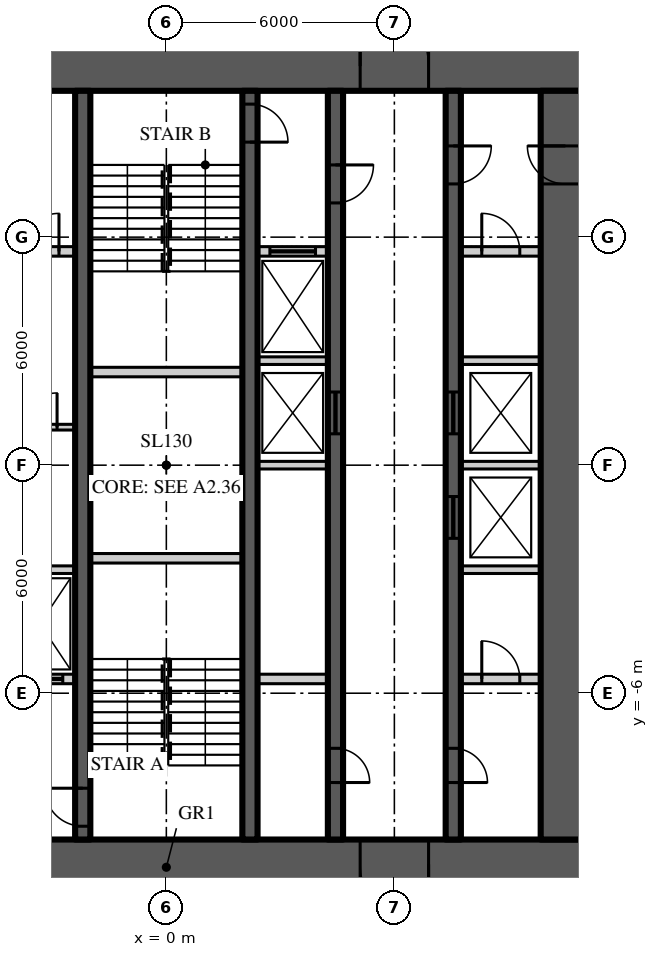
"""IFC4 building model, lengths in metres.
Left out: names, types, materials, properties, quantities, classifications, styles, units other than length and angle.
Written with IfcOpenShell. Run it as: python <this file> out.ifc"""

import sys

from ifc_helpers import new_model, si_unit, direction, frame, frame_2d, origin, place, context, subcontext, project, spatial, rectangle, extrude, element, fill, save


model = new_model("IFC4")
c1 = context("Model", 3, precision=1e-05, world=origin(), true_north=direction((0.0, 1.0)))
c2 = subcontext(c1, "Body", "Model", "MODEL_VIEW")
j1 = project(units=[si_unit("LENGTHUNIT", "METRE"), si_unit("PLANEANGLEUNIT", "RADIAN")], contexts=[c1])
p1 = place(None, origin())
s1 = spatial("IfcSite", under=j1, at=p1, CompositionType="ELEMENT")
p2 = place(p1, origin())
s2 = spatial("IfcBuilding", under=s1, at=p2, CompositionType="ELEMENT")
p3 = place(p2, frame((0.0, 0.0, 282.9)))
s3 = spatial("IfcBuildingStorey", under=s2, at=p3, CompositionType="ELEMENT", Elevation=282.9)
p4 = place(p3, frame((-11.15, 10.5, 0.0), z_axis=(0.0, 0.0, 1.0), x_axis=(1.0, 0.0, 0.0)))
e1 = element("IfcWall", 1, at=p4, inside=s3, PredefinedType="SHEAR", context=c2, shape_type="SweptSolid", body=[
    extrude(rectangle(XDim=22.3, YDim=1.3, at=frame_2d((11.15, 0.0))), origin(), (0.0, 0.0, 1.0), 3.9),
])
p5 = place(p4, frame((4.25, 0.0, 0.0)))
e2 = element("IfcOpeningElement", 2, at=p5, cuts=e1, PredefinedType="OPENING", context=c2, shape_type="SweptSolid", body=[
    extrude(rectangle(XDim=1.8, YDim=2.2, at=frame_2d((0.9, 1.1))), frame((0.0, 0.66, 0.0), z_axis=(0.0, -1.0, 0.0), x_axis=(1.0, 0.0, 0.0)), (0.0, 0.0, 1.0), 1.32),
])
p6 = place(p4, frame((16.25, 0.0, 0.0)))
e3 = element("IfcOpeningElement", 3, at=p6, cuts=e1, PredefinedType="OPENING", context=c2, shape_type="SweptSolid", body=[
    extrude(rectangle(XDim=1.8, YDim=2.2, at=frame_2d((0.9, 1.1))), frame((0.0, 0.66, 0.0), z_axis=(0.0, -1.0, 0.0), x_axis=(1.0, 0.0, 0.0)), (0.0, 0.0, 1.0), 1.32),
])
p7 = place(p3, frame((11.15, -10.5, 0.0), z_axis=(0.0, 0.0, 1.0), x_axis=(-1.0, 0.0, 0.0)))
e4 = element("IfcWall", 4, at=p7, inside=s3, PredefinedType="SHEAR", context=c2, shape_type="SweptSolid", body=[
    extrude(rectangle(XDim=22.3, YDim=1.3, at=frame_2d((11.15, 0.0))), origin(), (0.0, 0.0, 1.0), 3.9),
])
p8 = place(p7, frame((16.25, 0.0, 0.0)))
e5 = element("IfcOpeningElement", 5, at=p8, cuts=e4, PredefinedType="OPENING", context=c2, shape_type="SweptSolid", body=[
    extrude(rectangle(XDim=1.8, YDim=2.2, at=frame_2d((0.9, 1.1))), frame((0.0, 0.66, 0.0), z_axis=(0.0, -1.0, 0.0), x_axis=(1.0, 0.0, 0.0)), (0.0, 0.0, 1.0), 1.32),
])
p9 = place(p7, frame((4.25, 0.0, 0.0)))
e6 = element("IfcOpeningElement", 6, at=p9, cuts=e4, PredefinedType="OPENING", context=c2, shape_type="SweptSolid", body=[
    extrude(rectangle(XDim=1.8, YDim=2.2, at=frame_2d((0.9, 1.1))), frame((0.0, 0.66, 0.0), z_axis=(0.0, -1.0, 0.0), x_axis=(1.0, 0.0, 0.0)), (0.0, 0.0, 1.0), 1.32),
])
p10 = place(p3, frame((10.5, -9.85, 0.0), z_axis=(0.0, 0.0, 1.0), x_axis=(0.0, 1.0, 0.0)))
e7 = element("IfcWall", 7, at=p10, inside=s3, PredefinedType="SHEAR", context=c2, shape_type="SweptSolid", body=[
    extrude(rectangle(XDim=19.7, YDim=1.3, at=frame_2d((9.85, 0.0))), origin(), (0.0, 0.0, 1.0), 3.9),
])
p11 = place(p10, frame((17.25, 0.0, 0.0)))
e8 = element("IfcOpeningElement", 8, at=p11, cuts=e7, PredefinedType="OPENING", context=c2, shape_type="SweptSolid", body=[
    extrude(rectangle(XDim=1.0, YDim=2.2, at=frame_2d((0.5, 1.1))), frame((0.0, 0.66, 0.0), z_axis=(0.0, -1.0, 0.0), x_axis=(1.0, 0.0, 0.0)), (0.0, 0.0, 1.0), 1.32),
])
p12 = place(p3, frame((7.55, 9.85, 0.0), z_axis=(0.0, 0.0, 1.0), x_axis=(0.0, -1.0, 0.0)))
e9 = element("IfcWall", 9, at=p12, inside=s3, PredefinedType="SHEAR", context=c2, shape_type="SweptSolid", body=[
    extrude(rectangle(XDim=19.7, YDim=0.4, at=frame_2d((9.85, 0.0))), origin(), (0.0, 0.0, 1.0), 3.9),
])
p13 = place(p12, frame((1.45, 0.0, 0.0)))
e10 = element("IfcOpeningElement", 10, at=p13, cuts=e9, PredefinedType="OPENING", context=c2, shape_type="SweptSolid", body=[
    extrude(rectangle(XDim=1.0, YDim=2.2, at=frame_2d((0.5, 1.1))), frame((0.0, 0.21, 0.0), z_axis=(0.0, -1.0, 0.0), x_axis=(1.0, 0.0, 0.0)), (0.0, 0.0, 1.0), 0.42),
])
p14 = place(p12, frame((17.3, 0.0, 0.0)))
e11 = element("IfcOpeningElement", 11, at=p14, cuts=e9, PredefinedType="OPENING", context=c2, shape_type="SweptSolid", body=[
    extrude(rectangle(XDim=0.9, YDim=2.1, at=frame_2d((0.45, 1.05))), frame((0.0, 0.21, 0.0), z_axis=(0.0, -1.0, 0.0), x_axis=(1.0, 0.0, 0.0)), (0.0, 0.0, 1.0), 0.42),
])
p15 = place(p12, frame((7.925, 0.0, 0.0)))
e12 = element("IfcOpeningElement", 12, at=p15, cuts=e9, PredefinedType="OPENING", context=c2, shape_type="SweptSolid", body=[
    extrude(rectangle(XDim=1.1, YDim=2.2, at=frame_2d((0.55, 1.1))), frame((0.0, 0.21, 0.0), z_axis=(0.0, -1.0, 0.0), x_axis=(1.0, 0.0, 0.0)), (0.0, 0.0, 1.0), 0.42),
])
p16 = place(p12, frame((10.675, 0.0, 0.0)))
e13 = element("IfcOpeningElement", 13, at=p16, cuts=e9, PredefinedType="OPENING", context=c2, shape_type="SweptSolid", body=[
    extrude(rectangle(XDim=1.1, YDim=2.2, at=frame_2d((0.55, 1.1))), frame((0.0, 0.21, 0.0), z_axis=(0.0, -1.0, 0.0), x_axis=(1.0, 0.0, 0.0)), (0.0, 0.0, 1.0), 0.42),
])
p17 = place(p3, frame((4.45, 9.85, 0.0), z_axis=(0.0, 0.0, 1.0), x_axis=(0.0, -1.0, 0.0)))
e14 = element("IfcWall", 14, at=p17, inside=s3, PredefinedType="SHEAR", context=c2, shape_type="SweptSolid", body=[
    extrude(rectangle(XDim=19.7, YDim=0.4, at=frame_2d((9.85, 0.0))), origin(), (0.0, 0.0, 1.0), 3.9),
])
p18 = place(p17, frame((1.95, 0.0, 0.0)))
e15 = element("IfcOpeningElement", 15, at=p18, cuts=e14, PredefinedType="OPENING", context=c2, shape_type="SweptSolid", body=[
    extrude(rectangle(XDim=1.0, YDim=2.2, at=frame_2d((0.5, 1.1))), frame((0.0, 0.21, 0.0), z_axis=(0.0, -1.0, 0.0), x_axis=(1.0, 0.0, 0.0)), (0.0, 0.0, 1.0), 0.42),
])
p19 = place(p17, frame((17.3, 0.0, 0.0)))
e16 = element("IfcOpeningElement", 16, at=p19, cuts=e14, PredefinedType="OPENING", context=c2, shape_type="SweptSolid", body=[
    extrude(rectangle(XDim=0.9, YDim=2.1, at=frame_2d((0.45, 1.05))), frame((0.0, 0.21, 0.0), z_axis=(0.0, -1.0, 0.0), x_axis=(1.0, 0.0, 0.0)), (0.0, 0.0, 1.0), 0.42),
])
p20 = place(p17, frame((7.925, 0.0, 0.0)))
e17 = element("IfcOpeningElement", 17, at=p20, cuts=e14, PredefinedType="OPENING", context=c2, shape_type="SweptSolid", body=[
    extrude(rectangle(XDim=1.1, YDim=2.2, at=frame_2d((0.55, 1.1))), frame((0.0, 0.21, 0.0), z_axis=(0.0, -1.0, 0.0), x_axis=(1.0, 0.0, 0.0)), (0.0, 0.0, 1.0), 0.42),
])
p21 = place(p3, frame((-2.2, -9.85, 0.0), z_axis=(0.0, 0.0, 1.0), x_axis=(0.0, 1.0, 0.0)))
e18 = element("IfcWall", 18, at=p21, inside=s3, PredefinedType="SHEAR", context=c2, shape_type="SweptSolid", body=[
    extrude(rectangle(XDim=19.7, YDim=0.4, at=frame_2d((9.85, 0.0))), origin(), (0.0, 0.0, 1.0), 3.9),
])
p22 = place(p21, frame((0.35, 0.0, 0.0)))
e19 = element("IfcOpeningElement", 19, at=p22, cuts=e18, PredefinedType="OPENING", context=c2, shape_type="SweptSolid", body=[
    extrude(rectangle(XDim=1.0, YDim=2.2, at=frame_2d((0.5, 1.1))), frame((0.0, 0.21, 0.0), z_axis=(0.0, -1.0, 0.0), x_axis=(1.0, 0.0, 0.0)), (0.0, 0.0, 1.0), 0.42),
])
p23 = place(p3, frame((2.2, 9.85, 0.0), z_axis=(0.0, 0.0, 1.0), x_axis=(0.0, -1.0, 0.0)))
e20 = element("IfcWall", 20, at=p23, inside=s3, PredefinedType="SHEAR", context=c2, shape_type="SweptSolid", body=[
    extrude(rectangle(XDim=19.7, YDim=0.4, at=frame_2d((9.85, 0.0))), origin(), (0.0, 0.0, 1.0), 3.9),
])
p24 = place(p23, frame((0.35, 0.0, 0.0)))
e21 = element("IfcOpeningElement", 21, at=p24, cuts=e20, PredefinedType="OPENING", context=c2, shape_type="SweptSolid", body=[
    extrude(rectangle(XDim=1.0, YDim=2.2, at=frame_2d((0.5, 1.1))), frame((0.0, 0.21, 0.0), z_axis=(0.0, -1.0, 0.0), x_axis=(1.0, 0.0, 0.0)), (0.0, 0.0, 1.0), 0.42),
])
p25 = place(p3, frame((-4.25, 5.625, 0.0), z_axis=(0.0, 0.0, 1.0), x_axis=(1.0, 0.0, 0.0)))
e22 = element("IfcWall", 22, at=p25, inside=s3, PredefinedType="SOLIDWALL", context=c2, shape_type="SweptSolid", body=[
    extrude(rectangle(XDim=1.85, YDim=0.25, at=frame_2d((0.925, 0.0))), origin(), (0.0, 0.0, 1.0), 3.7),
])
p26 = place(p25, frame((0.425, 0.0, 0.0)))
e23 = element("IfcOpeningElement", 23, at=p26, cuts=e22, PredefinedType="OPENING", context=c2, shape_type="SweptSolid", body=[
    extrude(rectangle(XDim=1.0, YDim=2.2, at=frame_2d((0.5, 1.1))), frame((0.0, 0.135, 0.0), z_axis=(0.0, -1.0, 0.0), x_axis=(1.0, 0.0, 0.0)), (0.0, 0.0, 1.0), 0.27),
])
p27 = place(p3, frame((2.4, 5.625, 0.0), z_axis=(0.0, 0.0, 1.0), x_axis=(1.0, 0.0, 0.0)))
e24 = element("IfcWall", 24, at=p27, inside=s3, PredefinedType="SOLIDWALL", context=c2, shape_type="SweptSolid", body=[
    extrude(rectangle(XDim=1.85, YDim=0.25, at=frame_2d((0.925, 0.0))), origin(), (0.0, 0.0, 1.0), 3.7),
])
p28 = place(p27, frame((0.325, 0.0, 0.0)))
e25 = element("IfcOpeningElement", 25, at=p28, cuts=e24, PredefinedType="OPENING", context=c2, shape_type="SweptSolid", body=[
    extrude(rectangle(XDim=1.2, YDim=2.2, at=frame_2d((0.6, 1.1))), frame((0.0, 0.135, 0.0), z_axis=(0.0, -1.0, 0.0), x_axis=(1.0, 0.0, 0.0)), (0.0, 0.0, 1.0), 0.27),
])
p29 = place(p3, frame((7.75, 5.625, 0.0), z_axis=(0.0, 0.0, 1.0), x_axis=(1.0, 0.0, 0.0)))
e26 = element("IfcWall", 26, at=p29, inside=s3, PredefinedType="SOLIDWALL", context=c2, shape_type="SweptSolid", body=[
    extrude(rectangle(XDim=2.1, YDim=0.25, at=frame_2d((1.05, 0.0))), origin(), (0.0, 0.0, 1.0), 3.7),
])
p30 = place(p29, frame((0.55, 0.0, 0.0)))
e27 = element("IfcOpeningElement", 27, at=p30, cuts=e26, PredefinedType="OPENING", context=c2, shape_type="SweptSolid", body=[
    extrude(rectangle(XDim=1.0, YDim=2.2, at=frame_2d((0.5, 1.1))), frame((0.0, 0.135, 0.0), z_axis=(0.0, -1.0, 0.0), x_axis=(1.0, 0.0, 0.0)), (0.0, 0.0, 1.0), 0.27),
])
p31 = place(p3, frame((-4.25, -5.625, 0.0), z_axis=(0.0, 0.0, 1.0), x_axis=(1.0, 0.0, 0.0)))
e28 = element("IfcWall", 28, at=p31, inside=s3, PredefinedType="SOLIDWALL", context=c2, shape_type="SweptSolid", body=[
    extrude(rectangle(XDim=1.85, YDim=0.25, at=frame_2d((0.925, 0.0))), origin(), (0.0, 0.0, 1.0), 3.7),
])
p32 = place(p31, frame((0.325, 0.0, 0.0)))
e29 = element("IfcOpeningElement", 29, at=p32, cuts=e28, PredefinedType="OPENING", context=c2, shape_type="SweptSolid", body=[
    extrude(rectangle(XDim=1.2, YDim=2.2, at=frame_2d((0.6, 1.1))), frame((0.0, 0.135, 0.0), z_axis=(0.0, -1.0, 0.0), x_axis=(1.0, 0.0, 0.0)), (0.0, 0.0, 1.0), 0.27),
])
p33 = place(p3, frame((2.4, -5.625, 0.0), z_axis=(0.0, 0.0, 1.0), x_axis=(1.0, 0.0, 0.0)))
e30 = element("IfcWall", 30, at=p33, inside=s3, PredefinedType="SOLIDWALL", context=c2, shape_type="SweptSolid", body=[
    extrude(rectangle(XDim=1.85, YDim=0.25, at=frame_2d((0.925, 0.0))), origin(), (0.0, 0.0, 1.0), 3.7),
])
p34 = place(p3, frame((7.75, -5.625, 0.0), z_axis=(0.0, 0.0, 1.0), x_axis=(1.0, 0.0, 0.0)))
e31 = element("IfcWall", 31, at=p34, inside=s3, PredefinedType="SOLIDWALL", context=c2, shape_type="SweptSolid", body=[
    extrude(rectangle(XDim=2.1, YDim=0.25, at=frame_2d((1.05, 0.0))), origin(), (0.0, 0.0, 1.0), 3.7),
])
p35 = place(p34, frame((0.55, 0.0, 0.0)))
e32 = element("IfcOpeningElement", 32, at=p35, cuts=e31, PredefinedType="OPENING", context=c2, shape_type="SweptSolid", body=[
    extrude(rectangle(XDim=1.0, YDim=2.2, at=frame_2d((0.5, 1.1))), frame((0.0, 0.135, 0.0), z_axis=(0.0, -1.0, 0.0), x_axis=(1.0, 0.0, 0.0)), (0.0, 0.0, 1.0), 0.27),
])
for number, where, z_axis, x_axis in (
    (33, (-2.0, -2.45, 0.0), (0.0, 0.0, 1.0), (1.0, 0.0, 0.0)),
    (34, (-2.0, 2.45, 0.0), (0.0, 0.0, 1.0), (1.0, 0.0, 0.0)),
):
    element("IfcWall", number, at=place(p3, frame(where, z_axis=z_axis, x_axis=x_axis)), inside=s3, PredefinedType="SOLIDWALL", context=c2, shape_type="SweptSolid", body=[
        extrude(rectangle(XDim=4.0, YDim=0.25, at=frame_2d((2.0, 0.0))), origin(), (0.0, 0.0, 1.0), 3.7),
    ])
p36 = place(p3, frame((-4.25, -2.75, 0.0), z_axis=(0.0, 0.0, 1.0), x_axis=(1.0, 0.0, 0.0)))
e35 = element("IfcWall", 35, at=p36, inside=s3, PredefinedType="SOLIDWALL", context=c2, shape_type="SweptSolid", body=[
    extrude(rectangle(XDim=1.85, YDim=0.2, at=frame_2d((0.925, 0.0))), origin(), (0.0, 0.0, 1.0), 3.7),
])
p37 = place(p3, frame((7.75, -2.75, 0.0), z_axis=(0.0, 0.0, 1.0), x_axis=(1.0, 0.0, 0.0)))
e36 = element("IfcWall", 36, at=p37, inside=s3, PredefinedType="SOLIDWALL", context=c2, shape_type="SweptSolid", body=[
    extrude(rectangle(XDim=2.1, YDim=0.2, at=frame_2d((1.05, 0.0))), origin(), (0.0, 0.0, 1.0), 3.7),
])
p38 = place(p3, frame((2.4, 0.0, 0.0), z_axis=(0.0, 0.0, 1.0), x_axis=(1.0, 0.0, 0.0)))
e37 = element("IfcWall", 37, at=p38, inside=s3, PredefinedType="SOLIDWALL", context=c2, shape_type="SweptSolid", body=[
    extrude(rectangle(XDim=1.85, YDim=0.2, at=frame_2d((0.925, 0.0))), origin(), (0.0, 0.0, 1.0), 3.7),
])
p39 = place(p3, frame((7.75, 0.0, 0.0), z_axis=(0.0, 0.0, 1.0), x_axis=(1.0, 0.0, 0.0)))
e38 = element("IfcWall", 38, at=p39, inside=s3, PredefinedType="SOLIDWALL", context=c2, shape_type="SweptSolid", body=[
    extrude(rectangle(XDim=2.1, YDim=0.2, at=frame_2d((1.05, 0.0))), origin(), (0.0, 0.0, 1.0), 3.7),
])
p40 = place(p3, frame((2.4, 2.75, 0.0), z_axis=(0.0, 0.0, 1.0), x_axis=(1.0, 0.0, 0.0)))
e39 = element("IfcWall", 39, at=p40, inside=s3, PredefinedType="SOLIDWALL", context=c2, shape_type="SweptSolid", body=[
    extrude(rectangle(XDim=1.85, YDim=0.2, at=frame_2d((0.925, 0.0))), origin(), (0.0, 0.0, 1.0), 3.7),
])
p41 = place(p3, frame((7.75, 2.75, 0.0), z_axis=(0.0, 0.0, 1.0), x_axis=(1.0, 0.0, 0.0)))
e40 = element("IfcWall", 40, at=p41, inside=s3, PredefinedType="SOLIDWALL", context=c2, shape_type="SweptSolid", body=[
    extrude(rectangle(XDim=2.1, YDim=0.2, at=frame_2d((1.05, 0.0))), origin(), (0.0, 0.0, 1.0), 3.7),
])
p42 = place(p3, frame((-4.25, 1.0, 0.0), z_axis=(0.0, 0.0, 1.0), x_axis=(1.0, 0.0, 0.0)))
e41 = element("IfcWall", 41, at=p42, inside=s3, PredefinedType="SOLIDWALL", context=c2, shape_type="SweptSolid", body=[
    extrude(rectangle(XDim=1.85, YDim=0.15, at=frame_2d((0.925, 0.0))), origin(), (0.0, 0.0, 1.0), 3.77),
])
p43 = place(p42, frame((0.475, 0.0, 0.0)))
e42 = element("IfcOpeningElement", 42, at=p43, cuts=e41, PredefinedType="OPENING", context=c2, shape_type="SweptSolid", body=[
    extrude(rectangle(XDim=0.9, YDim=2.1, at=frame_2d((0.45, 1.05))), frame((0.0, 0.085, 0.0), z_axis=(0.0, -1.0, 0.0), x_axis=(1.0, 0.0, 0.0)), (0.0, 0.0, 1.0), 0.17),
])
p44 = place(p6, origin())
e43 = element("IfcDoor", 43, at=p44, inside=s3, OperationType="DOUBLE_DOOR_DOUBLE_SWING", PredefinedType="DOOR", context=c2, shape_type="SweptSolid", body=[
    extrude(rectangle(XDim=1.8, YDim=2.2, at=frame_2d((0.9, 1.1))), frame((0.0, 0.025, 0.0), z_axis=(0.0, -1.0, 0.0), x_axis=(1.0, 0.0, 0.0)), (0.0, 0.0, 1.0), 0.05),
])
fill(e3, e43)
p45 = place(p9, origin())
e44 = element("IfcDoor", 44, at=p45, inside=s3, OperationType="DOUBLE_DOOR_DOUBLE_SWING", PredefinedType="DOOR", context=c2, shape_type="SweptSolid", body=[
    extrude(rectangle(XDim=1.8, YDim=2.2, at=frame_2d((0.9, 1.1))), frame((0.0, 0.025, 0.0), z_axis=(0.0, -1.0, 0.0), x_axis=(1.0, 0.0, 0.0)), (0.0, 0.0, 1.0), 0.05),
])
fill(e6, e44)
p46 = place(p13, origin())
e45 = element("IfcDoor", 45, at=p46, inside=s3, OperationType="SINGLE_SWING_LEFT", PredefinedType="DOOR", context=c2, shape_type="SweptSolid", body=[
    extrude(rectangle(XDim=1.0, YDim=2.2, at=frame_2d((0.5, 1.1))), frame((0.0, 0.025, 0.0), z_axis=(0.0, -1.0, 0.0), x_axis=(1.0, 0.0, 0.0)), (0.0, 0.0, 1.0), 0.05),
])
fill(e10, e45)
p47 = place(p11, origin())
e46 = element("IfcDoor", 46, at=p47, inside=s3, OperationType="SINGLE_SWING_RIGHT", PredefinedType="DOOR", context=c2, shape_type="SweptSolid", body=[
    extrude(rectangle(XDim=1.0, YDim=2.2, at=frame_2d((0.5, 1.1))), frame((0.0, 0.025, 0.0), z_axis=(0.0, -1.0, 0.0), x_axis=(1.0, 0.0, 0.0)), (0.0, 0.0, 1.0), 0.05),
])
fill(e8, e46)
p48 = place(p22, origin())
e47 = element("IfcDoor", 47, at=p48, inside=s3, OperationType="SINGLE_SWING_RIGHT", PredefinedType="DOOR", context=c2, shape_type="SweptSolid", body=[
    extrude(rectangle(XDim=1.0, YDim=2.2, at=frame_2d((0.5, 1.1))), frame((0.0, 0.025, 0.0), z_axis=(0.0, -1.0, 0.0), x_axis=(1.0, 0.0, 0.0)), (0.0, 0.0, 1.0), 0.05),
])
fill(e19, e47)
p49 = place(p18, origin())
e48 = element("IfcDoor", 48, at=p49, inside=s3, OperationType="SINGLE_SWING_LEFT", PredefinedType="DOOR", context=c2, shape_type="SweptSolid", body=[
    extrude(rectangle(XDim=1.0, YDim=2.2, at=frame_2d((0.5, 1.1))), frame((0.0, 0.025, 0.0), z_axis=(0.0, -1.0, 0.0), x_axis=(1.0, 0.0, 0.0)), (0.0, 0.0, 1.0), 0.05),
])
fill(e15, e48)
p50 = place(p24, origin())
e49 = element("IfcDoor", 49, at=p50, inside=s3, OperationType="SINGLE_SWING_RIGHT", PredefinedType="DOOR", context=c2, shape_type="SweptSolid", body=[
    extrude(rectangle(XDim=1.0, YDim=2.2, at=frame_2d((0.5, 1.1))), frame((0.0, 0.025, 0.0), z_axis=(0.0, -1.0, 0.0), x_axis=(1.0, 0.0, 0.0)), (0.0, 0.0, 1.0), 0.05),
])
fill(e21, e49)
p51 = place(p14, origin())
e50 = element("IfcDoor", 50, at=p51, inside=s3, OperationType="SINGLE_SWING_RIGHT", PredefinedType="DOOR", context=c2, shape_type="SweptSolid", body=[
    extrude(rectangle(XDim=0.9, YDim=2.1, at=frame_2d((0.45, 1.05))), frame((0.0, 0.025, 0.0), z_axis=(0.0, -1.0, 0.0), x_axis=(1.0, 0.0, 0.0)), (0.0, 0.0, 1.0), 0.05),
])
fill(e11, e50)
p52 = place(p19, origin())
e51 = element("IfcDoor", 51, at=p52, inside=s3, OperationType="SINGLE_SWING_RIGHT", PredefinedType="DOOR", context=c2, shape_type="SweptSolid", body=[
    extrude(rectangle(XDim=0.9, YDim=2.1, at=frame_2d((0.45, 1.05))), frame((0.0, 0.025, 0.0), z_axis=(0.0, -1.0, 0.0), x_axis=(1.0, 0.0, 0.0)), (0.0, 0.0, 1.0), 0.05),
])
fill(e16, e51)
p53 = place(p15, origin())
e52 = element("IfcDoor", 52, at=p53, inside=s3, OperationType="SLIDING_TO_LEFT", PredefinedType="DOOR", context=c2, shape_type="SweptSolid", body=[
    extrude(rectangle(XDim=1.1, YDim=2.2, at=frame_2d((0.55, 1.1))), frame((0.0, 0.025, 0.0), z_axis=(0.0, -1.0, 0.0), x_axis=(1.0, 0.0, 0.0)), (0.0, 0.0, 1.0), 0.05),
])
fill(e12, e52)
p54 = place(p16, origin())
e53 = element("IfcDoor", 53, at=p54, inside=s3, OperationType="SLIDING_TO_LEFT", PredefinedType="DOOR", context=c2, shape_type="SweptSolid", body=[
    extrude(rectangle(XDim=1.1, YDim=2.2, at=frame_2d((0.55, 1.1))), frame((0.0, 0.025, 0.0), z_axis=(0.0, -1.0, 0.0), x_axis=(1.0, 0.0, 0.0)), (0.0, 0.0, 1.0), 0.05),
])
fill(e13, e53)
p55 = place(p20, origin())
e54 = element("IfcDoor", 54, at=p55, inside=s3, OperationType="SLIDING_TO_LEFT", PredefinedType="DOOR", context=c2, shape_type="SweptSolid", body=[
    extrude(rectangle(XDim=1.1, YDim=2.2, at=frame_2d((0.55, 1.1))), frame((0.0, 0.025, 0.0), z_axis=(0.0, -1.0, 0.0), x_axis=(1.0, 0.0, 0.0)), (0.0, 0.0, 1.0), 0.05),
])
fill(e17, e54)
p56 = place(p32, origin())
e55 = element("IfcDoor", 55, at=p56, inside=s3, OperationType="SLIDING_TO_LEFT", PredefinedType="DOOR", context=c2, shape_type="SweptSolid", body=[
    extrude(rectangle(XDim=1.2, YDim=2.2, at=frame_2d((0.6, 1.1))), frame((0.0, 0.025, 0.0), z_axis=(0.0, -1.0, 0.0), x_axis=(1.0, 0.0, 0.0)), (0.0, 0.0, 1.0), 0.05),
])
fill(e29, e55)
p57 = place(p28, origin())
e56 = element("IfcDoor", 56, at=p57, inside=s3, OperationType="SLIDING_TO_LEFT", PredefinedType="DOOR", context=c2, shape_type="SweptSolid", body=[
    extrude(rectangle(XDim=1.2, YDim=2.2, at=frame_2d((0.6, 1.1))), frame((0.0, 0.025, 0.0), z_axis=(0.0, -1.0, 0.0), x_axis=(1.0, 0.0, 0.0)), (0.0, 0.0, 1.0), 0.05),
])
fill(e25, e56)
p58 = place(p43, origin())
e57 = element("IfcDoor", 57, at=p58, inside=s3, OperationType="SINGLE_SWING_RIGHT", PredefinedType="DOOR", context=c2, shape_type="SweptSolid", body=[
    extrude(rectangle(XDim=0.9, YDim=2.1, at=frame_2d((0.45, 1.05))), frame((0.0, 0.025, 0.0), z_axis=(0.0, -1.0, 0.0), x_axis=(1.0, 0.0, 0.0)), (0.0, 0.0, 1.0), 0.05),
])
fill(e42, e57)
p59 = place(p26, origin())
e58 = element("IfcDoor", 58, at=p59, inside=s3, OperationType="SINGLE_SWING_RIGHT", PredefinedType="DOOR", context=c2, shape_type="SweptSolid", body=[
    extrude(rectangle(XDim=1.0, YDim=2.2, at=frame_2d((0.5, 1.1))), frame((0.0, 0.025, 0.0), z_axis=(0.0, -1.0, 0.0), x_axis=(1.0, 0.0, 0.0)), (0.0, 0.0, 1.0), 0.05),
])
fill(e23, e58)
p60 = place(p30, origin())
e59 = element("IfcDoor", 59, at=p60, inside=s3, OperationType="SINGLE_SWING_LEFT", PredefinedType="DOOR", context=c2, shape_type="SweptSolid", body=[
    extrude(rectangle(XDim=1.0, YDim=2.2, at=frame_2d((0.5, 1.1))), frame((0.0, 0.025, 0.0), z_axis=(0.0, -1.0, 0.0), x_axis=(1.0, 0.0, 0.0)), (0.0, 0.0, 1.0), 0.05),
])
fill(e27, e59)
p61 = place(p35, origin())
e60 = element("IfcDoor", 60, at=p61, inside=s3, OperationType="SINGLE_SWING_LEFT", PredefinedType="DOOR", context=c2, shape_type="SweptSolid", body=[
    extrude(rectangle(XDim=1.0, YDim=2.2, at=frame_2d((0.5, 1.1))), frame((0.0, 0.025, 0.0), z_axis=(0.0, -1.0, 0.0), x_axis=(1.0, 0.0, 0.0)), (0.0, 0.0, 1.0), 0.05),
])
fill(e32, e60)
save(model, sys.argv[1])
